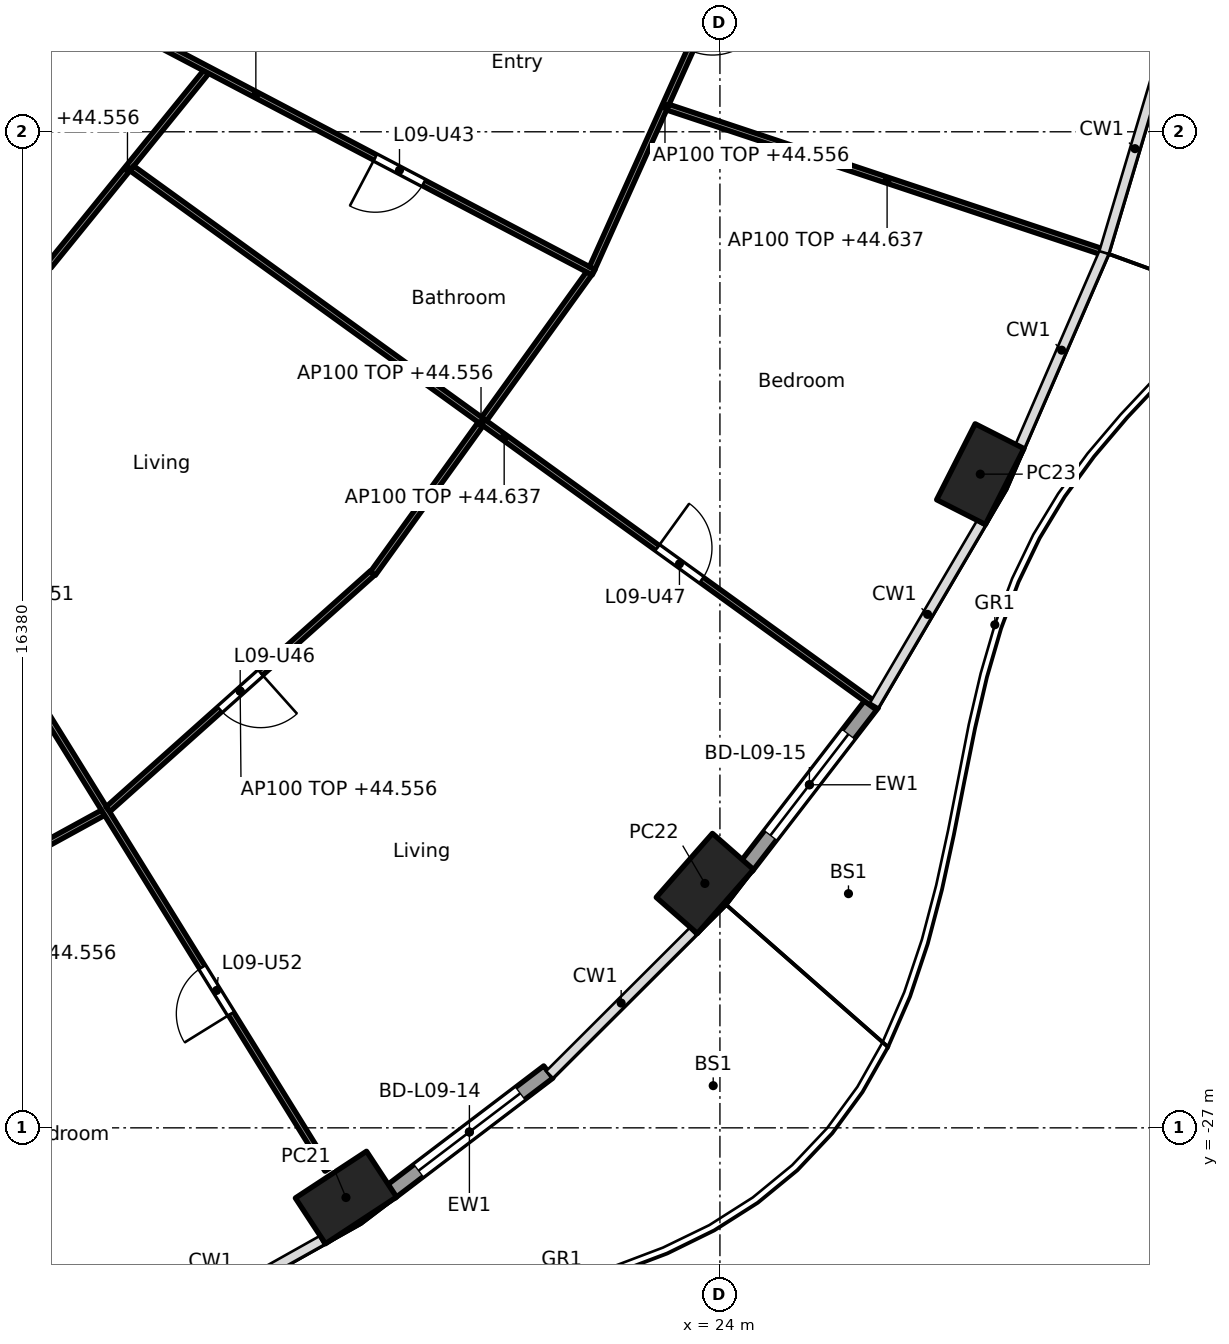
"""IFC4 building model, lengths in metres.
Left out: names, types, materials, properties, quantities, classifications, styles, units other than length and angle.
Written with IfcOpenShell. Run it as: python <this file> out.ifc"""

import sys

from ifc_helpers import new_model, si_unit, direction, frame, frame_2d, origin, origin_2d, place, context, subcontext, project, spatial, rectangle, hollow_rectangle, extrude, element, fill, save


model = new_model("IFC4")
c1 = context("Model", 3, precision=1e-05, world=origin(), true_north=direction((0.0, 1.0)))
c2 = subcontext(c1, "Body", "Model", "MODEL_VIEW")
j1 = project(units=[si_unit("LENGTHUNIT", "METRE"), si_unit("PLANEANGLEUNIT", "RADIAN")], contexts=[c1])
p1 = place(None, origin())
s1 = spatial("IfcSite", under=j1, at=p1, CompositionType="ELEMENT")
p2 = place(p1, origin())
s2 = spatial("IfcBuilding", under=s1, at=p2, CompositionType="ELEMENT")
p3 = place(p2, frame((0.0, 0.0, 41.8)))
s3 = spatial("IfcBuildingStorey", under=s2, at=p3, CompositionType="ELEMENT", Elevation=41.8)
for number, where, z_axis, x_axis in (
    (1, (17.85, -28.146, 0.0), (0.0, 0.0, 1.0), (0.836, 0.549, 0.0)),
    (2, (23.752, -22.981, 0.0), (0.0, 0.0, 1.0), (0.66, 0.751, 0.0)),
    (3, (28.282, -16.25, 0.0), (0.0, 0.0, 1.0), (0.452, 0.892, 0.0)),
):
    element("IfcColumn", number, at=place(p3, frame(where, z_axis=z_axis, x_axis=x_axis)), inside=s3, PredefinedType="COLUMN", context=c2, shape_type="SweptSolid", body=[
        extrude(hollow_rectangle(XDim=1.4, YDim=0.9, WallThickness=0.05, at=origin_2d()), origin(), (0.0, 0.0, 1.0), 3.7),
    ])
p4 = place(p3, frame((21.178, -26.081, 0.0), z_axis=(0.0, 0.0, 1.0), x_axis=(-0.796022293214, -0.605267303517, 0.0)))
e4 = element("IfcWall", 4, at=p4, inside=s3, PredefinedType="SOLIDWALL", context=c2, shape_type="SweptSolid", body=[
    extrude(rectangle(XDim=3.262, YDim=0.25, at=frame_2d((1.631, 0.0))), origin(), (0.0, 0.0, 1.0), 3.44),
])
p5 = place(p4, frame((0.581, 0.0, 0.0)))
e5 = element("IfcOpeningElement", 5, at=p5, cuts=e4, PredefinedType="OPENING", context=c2, shape_type="SweptSolid", body=[
    extrude(rectangle(XDim=2.1, YDim=2.4, at=frame_2d((1.05, 1.2))), frame((0.0, 0.135, 0.0), z_axis=(0.0, -1.0, 0.0), x_axis=(1.0, 0.0, 0.0)), (0.0, 0.0, 1.0), 0.27),
])
p6 = place(p3, frame((26.508, -20.013, 0.0), z_axis=(0.0, 0.0, 1.0), x_axis=(-0.610457147657, -0.792049285635, 0.0)))
e6 = element("IfcWall", 6, at=p6, inside=s3, PredefinedType="SOLIDWALL", context=c2, shape_type="SweptSolid", body=[
    extrude(rectangle(XDim=3.397, YDim=0.25, at=frame_2d((1.699, 0.0))), origin(), (0.0, 0.0, 1.0), 3.44),
])
p7 = place(p6, frame((0.649, 0.0, 0.0)))
e7 = element("IfcOpeningElement", 7, at=p7, cuts=e6, PredefinedType="OPENING", context=c2, shape_type="SweptSolid", body=[
    extrude(rectangle(XDim=2.1, YDim=2.4, at=frame_2d((1.05, 1.2))), frame((0.0, 0.135, 0.0), z_axis=(0.0, -1.0, 0.0), x_axis=(1.0, 0.0, 0.0)), (0.0, 0.0, 1.0), 0.27),
])
p8 = place(p3, frame((9.045, -24.456, 0.0), z_axis=(0.0, 0.0, 1.0), x_axis=(0.876809987787, 0.480837025734, 0.0)))
e8 = element("IfcWall", 8, at=p8, inside=s3, PredefinedType="PARTITIONING", context=c2, shape_type="SweptSolid", body=[
    extrude(rectangle(XDim=5.486, YDim=0.1, at=frame_2d((2.743, 0.0))), origin(), (0.0, 0.0, 1.0), 2.756),
])
p9 = place(p3, frame((7.097, -10.81, 0.0), z_axis=(0.0, 0.0, 1.0), x_axis=(0.526453266471, -0.850204068576, 0.0)))
e9 = element("IfcWall", 9, at=p9, inside=s3, PredefinedType="PARTITIONING", context=c2, shape_type="SweptSolid", body=[
    extrude(rectangle(XDim=19.85, YDim=0.1, at=frame_2d((9.925, 0.0))), origin(), (0.0, 0.0, 1.0), 2.687),
])
p10 = place(p9, frame((0.35, 0.0, 0.0)))
e10 = element("IfcOpeningElement", 10, at=p10, cuts=e9, PredefinedType="OPENING", context=c2, shape_type="SweptSolid", body=[
    extrude(rectangle(XDim=0.9, YDim=2.1, at=frame_2d((0.45, 1.05))), frame((0.0, 0.06, 0.0), z_axis=(0.0, -1.0, 0.0), x_axis=(1.0, 0.0, 0.0)), (0.0, 0.0, 1.0), 0.12),
])
p11 = place(p9, frame((8.795, 0.0, 0.0)))
e11 = element("IfcOpeningElement", 11, at=p11, cuts=e9, PredefinedType="OPENING", context=c2, shape_type="SweptSolid", body=[
    extrude(rectangle(XDim=0.9, YDim=2.1, at=frame_2d((0.45, 1.05))), frame((0.0, 0.06, 0.0), z_axis=(0.0, -1.0, 0.0), x_axis=(1.0, 0.0, 0.0)), (0.0, 0.0, 1.0), 0.12),
])
p12 = place(p9, frame((15.935, 0.0, 0.0)))
e12 = element("IfcOpeningElement", 12, at=p12, cuts=e9, PredefinedType="OPENING", context=c2, shape_type="SweptSolid", body=[
    extrude(rectangle(XDim=0.9, YDim=2.1, at=frame_2d((0.45, 1.05))), frame((0.0, 0.06, 0.0), z_axis=(0.0, -1.0, 0.0), x_axis=(1.0, 0.0, 0.0)), (0.0, 0.0, 1.0), 0.12),
])
p13 = place(p3, frame((13.936, -21.761, 0.0), z_axis=(0.0, 0.0, 1.0), x_axis=(0.745806142791, 0.666163041136, 0.0)))
e13 = element("IfcWall", 13, at=p13, inside=s3, PredefinedType="PARTITIONING", context=c2, shape_type="SweptSolid", body=[
    extrude(rectangle(XDim=5.831, YDim=0.1, at=frame_2d((2.915, 0.0))), origin(), (0.0, 0.0, 1.0), 2.756),
])
p14 = place(p13, frame((2.465, 0.0, 0.0)))
e14 = element("IfcOpeningElement", 14, at=p14, cuts=e13, PredefinedType="OPENING", context=c2, shape_type="SweptSolid", body=[
    extrude(rectangle(XDim=0.9, YDim=2.1, at=frame_2d((0.45, 1.05))), frame((0.0, 0.06, 0.0), z_axis=(0.0, -1.0, 0.0), x_axis=(1.0, 0.0, 0.0)), (0.0, 0.0, 1.0), 0.12),
])
p15 = place(p3, frame((12.963, -12.825, 0.0), z_axis=(0.0, 0.0, 1.0), x_axis=(0.63012473344, 0.776493928056, 0.0)))
e15 = element("IfcWall", 15, at=p15, inside=s3, PredefinedType="PARTITIONING", context=c2, shape_type="SweptSolid", body=[
    extrude(rectangle(XDim=4.106, YDim=0.1, at=frame_2d((2.053, 0.0))), origin(), (0.0, 0.0, 1.0), 2.756),
])
p16 = place(p3, frame((18.293, -17.884, 0.0), z_axis=(0.0, 0.0, 1.0), x_axis=(0.584558392935, 0.811351640936, 0.0)))
e16 = element("IfcWall", 16, at=p16, inside=s3, PredefinedType="PARTITIONING", context=c2, shape_type="SweptSolid", body=[
    extrude(rectangle(XDim=6.084, YDim=0.1, at=frame_2d((3.042, 0.0))), origin(), (0.0, 0.0, 1.0), 2.756),
])
p17 = place(p3, frame((14.329, -11.221, 0.0), z_axis=(0.0, 0.0, 1.0), x_axis=(0.810671130917, -0.58550176558, 0.0)))
e17 = element("IfcWall", 17, at=p17, inside=s3, PredefinedType="PARTITIONING", context=c2, shape_type="SweptSolid", body=[
    extrude(rectangle(XDim=15.106, YDim=0.1, at=frame_2d((7.553, 0.0))), origin(), (0.0, 0.0, 1.0), 2.837),
])
p18 = place(p17, frame((10.659, 0.0, 0.0)))
e18 = element("IfcOpeningElement", 18, at=p18, cuts=e17, PredefinedType="OPENING", context=c2, shape_type="SweptSolid", body=[
    extrude(rectangle(XDim=0.9, YDim=2.1, at=frame_2d((0.45, 1.05))), frame((0.0, 0.06, 0.0), z_axis=(0.0, -1.0, 0.0), x_axis=(1.0, 0.0, 0.0)), (0.0, 0.0, 1.0), 0.12),
])
p19 = place(p3, frame((10.813, -7.091, 0.0), z_axis=(0.0, 0.0, 1.0), x_axis=(0.885182649479, -0.465243674928, 0.0)))
e19 = element("IfcWall", 19, at=p19, inside=s3, PredefinedType="PARTITIONING", context=c2, shape_type="SweptSolid", body=[
    extrude(rectangle(XDim=12.551, YDim=0.1, at=frame_2d((6.275, 0.0))), origin(), (0.0, 0.0, 1.0), 2.687),
])
p20 = place(p19, frame((0.539, 0.0, 0.0)))
e20 = element("IfcOpeningElement", 20, at=p20, cuts=e19, PredefinedType="OPENING", context=c2, shape_type="SweptSolid", body=[
    extrude(rectangle(XDim=0.9, YDim=2.1, at=frame_2d((0.45, 1.05))), frame((0.0, 0.06, 0.0), z_axis=(0.0, -1.0, 0.0), x_axis=(1.0, 0.0, 0.0)), (0.0, 0.0, 1.0), 0.12),
])
p21 = place(p19, frame((8.494, 0.0, 0.0)))
e21 = element("IfcOpeningElement", 21, at=p21, cuts=e19, PredefinedType="OPENING", context=c2, shape_type="SweptSolid", body=[
    extrude(rectangle(XDim=0.9, YDim=2.1, at=frame_2d((0.45, 1.05))), frame((0.0, 0.06, 0.0), z_axis=(0.0, -1.0, 0.0), x_axis=(1.0, 0.0, 0.0)), (0.0, 0.0, 1.0), 0.12),
])
p22 = place(p3, frame((21.899, -12.861, 0.0), z_axis=(0.0, 0.0, 1.0), x_axis=(0.410197710154, 0.911996622025, 0.0)))
e22 = element("IfcWall", 22, at=p22, inside=s3, PredefinedType="PARTITIONING", context=c2, shape_type="SweptSolid", body=[
    extrude(rectangle(XDim=5.837, YDim=0.1, at=frame_2d((2.918, 0.0))), origin(), (0.0, 0.0, 1.0), 2.756),
])
p23 = place(p22, frame((3.928, 0.0, 0.0)))
e23 = element("IfcOpeningElement", 23, at=p23, cuts=e22, PredefinedType="OPENING", context=c2, shape_type="SweptSolid", body=[
    extrude(rectangle(XDim=0.9, YDim=2.1, at=frame_2d((0.45, 1.05))), frame((0.0, 0.06, 0.0), z_axis=(0.0, -1.0, 0.0), x_axis=(1.0, 0.0, 0.0)), (0.0, 0.0, 1.0), 0.12),
])
p24 = place(p3, frame((23.144, -10.216, 0.0), z_axis=(0.0, 0.0, 1.0), x_axis=(0.948811715359, -0.315842253027, 0.0)))
e24 = element("IfcWall", 24, at=p24, inside=s3, PredefinedType="PARTITIONING", context=c2, shape_type="SweptSolid", body=[
    extrude(rectangle(XDim=7.6, YDim=0.1, at=frame_2d((3.8, 0.0))), origin(), (0.0, 0.0, 1.0), 2.837),
])
p25 = place(p5, origin())
e25 = element("IfcDoor", 25, at=p25, inside=s3, OperationType="SLIDING_TO_LEFT", PredefinedType="DOOR", context=c2, shape_type="SweptSolid", body=[
    extrude(rectangle(XDim=2.1, YDim=2.4, at=frame_2d((1.05, 1.2))), frame((0.0, 0.025, 0.0), z_axis=(0.0, -1.0, 0.0), x_axis=(1.0, 0.0, 0.0)), (0.0, 0.0, 1.0), 0.05),
])
fill(e5, e25)
p26 = place(p7, origin())
e26 = element("IfcDoor", 26, at=p26, inside=s3, OperationType="SLIDING_TO_LEFT", PredefinedType="DOOR", context=c2, shape_type="SweptSolid", body=[
    extrude(rectangle(XDim=2.1, YDim=2.4, at=frame_2d((1.05, 1.2))), frame((0.0, 0.025, 0.0), z_axis=(0.0, -1.0, 0.0), x_axis=(1.0, 0.0, 0.0)), (0.0, 0.0, 1.0), 0.05),
])
fill(e7, e26)
p27 = place(p21, frame((0.9, 0.0, 0.0), x_axis=(-1.0, 0.0, 0.0)))
e27 = element("IfcDoor", 27, at=p27, inside=s3, OperationType="SINGLE_SWING_RIGHT", PredefinedType="DOOR", context=c2, shape_type="SweptSolid", body=[
    extrude(rectangle(XDim=0.9, YDim=2.1, at=frame_2d((0.45, 1.05))), frame((0.0, 0.025, 0.0), z_axis=(0.0, -1.0, 0.0), x_axis=(1.0, 0.0, 0.0)), (0.0, 0.0, 1.0), 0.05),
])
fill(e21, e27)
p28 = place(p14, frame((0.9, 0.0, 0.0), x_axis=(-1.0, 0.0, 0.0)))
e28 = element("IfcDoor", 28, at=p28, inside=s3, OperationType="SINGLE_SWING_LEFT", PredefinedType="DOOR", context=c2, shape_type="SweptSolid", body=[
    extrude(rectangle(XDim=0.9, YDim=2.1, at=frame_2d((0.45, 1.05))), frame((0.0, 0.025, 0.0), z_axis=(0.0, -1.0, 0.0), x_axis=(1.0, 0.0, 0.0)), (0.0, 0.0, 1.0), 0.05),
])
fill(e14, e28)
p29 = place(p18, origin())
e29 = element("IfcDoor", 29, at=p29, inside=s3, OperationType="SINGLE_SWING_LEFT", PredefinedType="DOOR", context=c2, shape_type="SweptSolid", body=[
    extrude(rectangle(XDim=0.9, YDim=2.1, at=frame_2d((0.45, 1.05))), frame((0.0, 0.025, 0.0), z_axis=(0.0, -1.0, 0.0), x_axis=(1.0, 0.0, 0.0)), (0.0, 0.0, 1.0), 0.05),
])
fill(e18, e29)
p30 = place(p12, frame((0.9, 0.0, 0.0), x_axis=(-1.0, 0.0, 0.0)))
e30 = element("IfcDoor", 30, at=p30, inside=s3, OperationType="SINGLE_SWING_LEFT", PredefinedType="DOOR", context=c2, shape_type="SweptSolid", body=[
    extrude(rectangle(XDim=0.9, YDim=2.1, at=frame_2d((0.45, 1.05))), frame((0.0, 0.025, 0.0), z_axis=(0.0, -1.0, 0.0), x_axis=(1.0, 0.0, 0.0)), (0.0, 0.0, 1.0), 0.05),
])
fill(e12, e30)
save(model, sys.argv[1])
